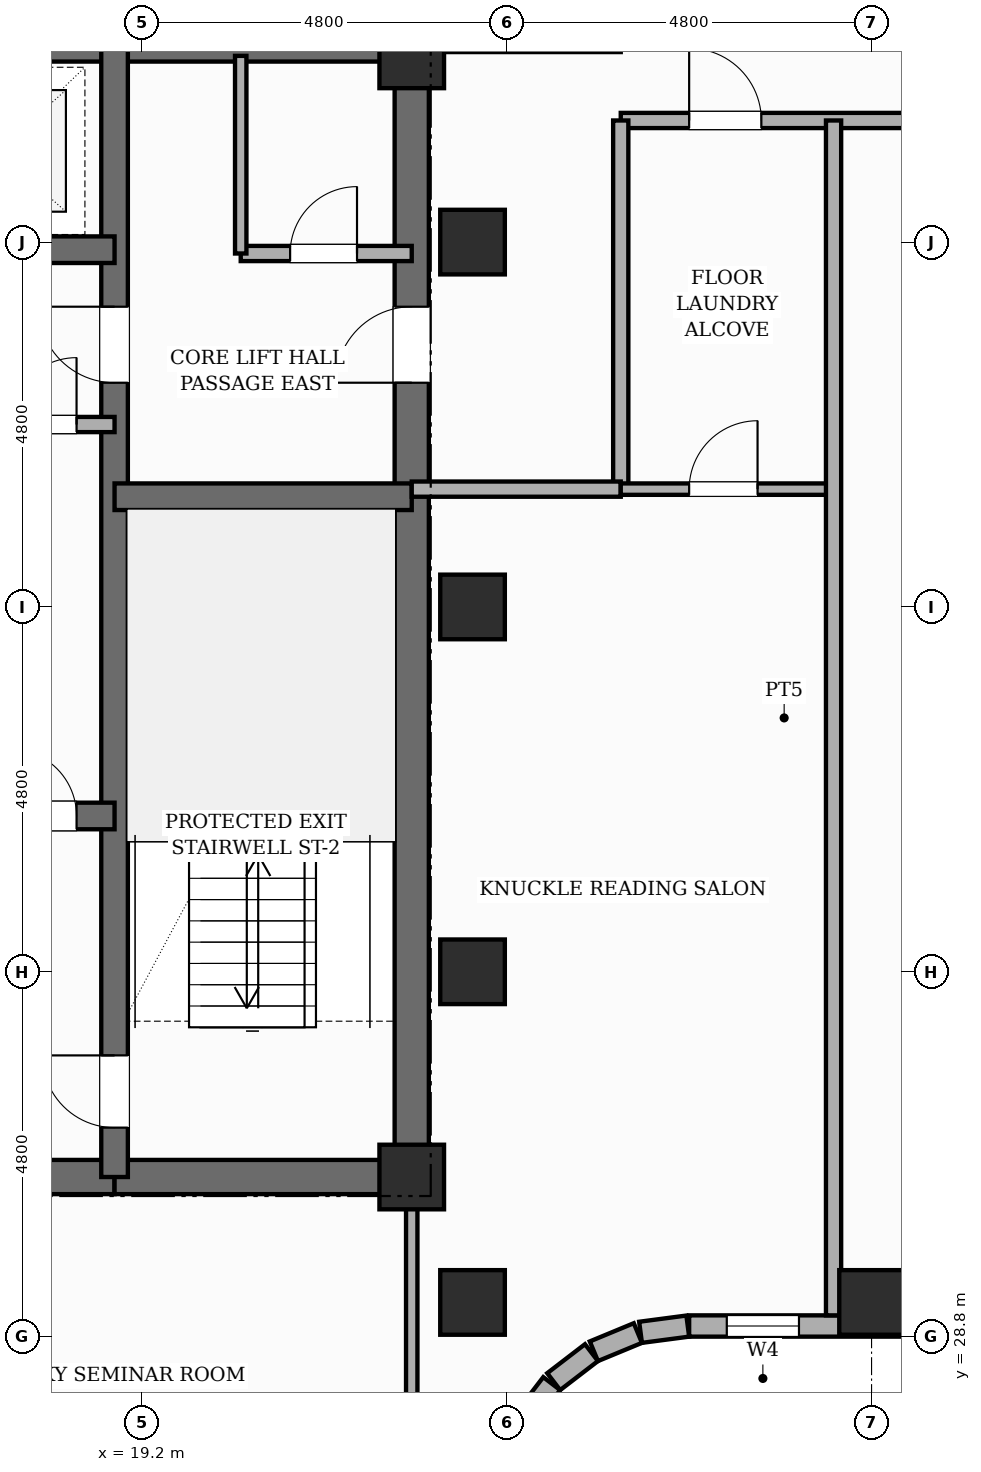
"""IFC4 building model, lengths in metres.
Left out: names, types, materials, properties, quantities, classifications, styles, units other than length and angle.
Written with IfcOpenShell. Run it as: python <this file> out.ifc"""

import sys

from ifc_helpers import new_model, si_unit, direction, frame, frame_2d, origin, origin_2d, place, context, subcontext, project, spatial, rectangle, extrude, element, fill, save


model = new_model("IFC4")
c1 = context("Model", 3, precision=1e-05, world=origin(), true_north=direction((0.0, 1.0)))
c2 = subcontext(c1, "Body", "Model", "MODEL_VIEW")
j1 = project(units=[si_unit("LENGTHUNIT", "METRE"), si_unit("PLANEANGLEUNIT", "RADIAN")], contexts=[c1])
p1 = place(None, origin())
s1 = spatial("IfcSite", under=j1, at=p1, CompositionType="ELEMENT")
p2 = place(p1, origin())
s2 = spatial("IfcBuilding", under=s1, at=p2, CompositionType="ELEMENT")
p3 = place(p2, frame((0.0, 0.0, 207.4)))
s3 = spatial("IfcBuildingStorey", under=s2, at=p3, CompositionType="ELEMENT", Elevation=207.4)
p4 = place(p3, frame((22.75, 30.675, 0.0), z_axis=(0.0, 0.0, 1.0), x_axis=(0.0, 1.0, 0.0)))
e1 = element("IfcWall", 1, at=p4, inside=s3, PredefinedType="SHEAR", context=c2, shape_type="SweptSolid", body=[
    extrude(rectangle(XDim=15.35, YDim=0.45, at=frame_2d((7.675, 0.0))), origin(), (0.0, 0.0, 1.0), 3.6),
])
p5 = place(p4, frame((10.675, 0.0, 0.0)))
e2 = element("IfcOpeningElement", 2, at=p5, cuts=e1, PredefinedType="OPENING", context=c2, shape_type="SweptSolid", body=[
    extrude(rectangle(XDim=1.0, YDim=2.15, at=frame_2d((0.5, 1.075))), frame((0.0, 0.235, 0.0), z_axis=(0.0, -1.0, 0.0), x_axis=(1.0, 0.0, 0.0)), (0.0, 0.0, 1.0), 0.47),
])
p6 = place(p3, frame((6.05, 45.8, 0.0), z_axis=(0.0, 0.0, 1.0), x_axis=(1.0, 0.0, 0.0)))
e3 = element("IfcWall", 3, at=p6, inside=s3, PredefinedType="SHEAR", context=c2, shape_type="SweptSolid", body=[
    extrude(rectangle(XDim=16.7, YDim=0.45, at=frame_2d((8.35, 0.0))), origin(), (0.0, 0.0, 1.0), 3.6),
])
p7 = place(p3, frame((9.96, 30.9, 0.0), z_axis=(0.0, 0.0, 1.0), x_axis=(1.0, 0.0, 0.0)))
e4 = element("IfcWall", 4, at=p7, inside=s3, PredefinedType="SHEAR", context=c2, shape_type="SweptSolid", body=[
    extrude(rectangle(XDim=8.88, YDim=0.45, at=frame_2d((4.44, 0.0))), origin(), (0.0, 0.0, 1.0), 3.6),
])
p8 = place(p7, frame((4.09, 0.0, 0.0)))
e5 = element("IfcOpeningElement", 5, at=p8, cuts=e4, PredefinedType="OPENING", context=c2, shape_type="SweptSolid", body=[
    extrude(rectangle(XDim=1.0, YDim=2.15, at=frame_2d((0.5, 1.075))), frame((0.0, 0.235, 0.0), z_axis=(0.0, -1.0, 0.0), x_axis=(1.0, 0.0, 0.0)), (0.0, 0.0, 1.0), 0.47),
])
p9 = place(p3, frame((18.84, 30.9, 0.0), z_axis=(0.0, 0.0, 1.0), x_axis=(1.0, 0.0, 0.0)))
e6 = element("IfcWall", 6, at=p9, inside=s3, PredefinedType="SHEAR", context=c2, shape_type="SweptSolid", body=[
    extrude(rectangle(XDim=3.91, YDim=0.45, at=frame_2d((1.955, 0.0))), origin(), (0.0, 0.0, 1.0), 3.6),
])
p10 = place(p3, frame((18.84, 30.9, 0.0), z_axis=(0.0, 0.0, 1.0), x_axis=(0.0, 1.0, 0.0)))
e7 = element("IfcWall", 7, at=p10, inside=s3, PredefinedType="SHEAR", context=c2, shape_type="SweptSolid", body=[
    extrude(rectangle(XDim=14.9, YDim=0.35, at=frame_2d((7.45, 0.0))), origin(), (0.0, 0.0, 1.0), 3.6),
])
p11 = place(p10, frame((0.65, 0.0, 0.0)))
e8 = element("IfcOpeningElement", 8, at=p11, cuts=e7, PredefinedType="OPENING", context=c2, shape_type="SweptSolid", body=[
    extrude(rectangle(XDim=0.95, YDim=2.1, at=frame_2d((0.475, 1.05))), frame((0.0, 0.185, 0.0), z_axis=(0.0, -1.0, 0.0), x_axis=(1.0, 0.0, 0.0)), (0.0, 0.0, 1.0), 0.37),
])
p12 = place(p10, frame((10.45, 0.0, 0.0)))
e9 = element("IfcOpeningElement", 9, at=p12, cuts=e7, PredefinedType="OPENING", context=c2, shape_type="SweptSolid", body=[
    extrude(rectangle(XDim=1.0, YDim=2.15, at=frame_2d((0.5, 1.075))), frame((0.0, 0.185, 0.0), z_axis=(0.0, -1.0, 0.0), x_axis=(1.0, 0.0, 0.0)), (0.0, 0.0, 1.0), 0.37),
])
p13 = place(p3, frame((18.84, 39.85, 0.0), z_axis=(0.0, 0.0, 1.0), x_axis=(1.0, 0.0, 0.0)))
e10 = element("IfcWall", 10, at=p13, inside=s3, PredefinedType="SHEAR", context=c2, shape_type="SweptSolid", body=[
    extrude(rectangle(XDim=3.91, YDim=0.35, at=frame_2d((1.955, 0.0))), origin(), (0.0, 0.0, 1.0), 3.6),
])
p14 = place(p3, frame((9.96, 35.65, 0.0), z_axis=(0.0, 0.0, 1.0), x_axis=(1.0, 0.0, 0.0)))
e11 = element("IfcWall", 11, at=p14, inside=s3, PredefinedType="SHEAR", context=c2, shape_type="SweptSolid", body=[
    extrude(rectangle(XDim=8.88, YDim=0.35, at=frame_2d((4.44, 0.0))), origin(), (0.0, 0.0, 1.0), 3.6),
])
p15 = place(p14, frame((0.84, 0.0, 0.0)))
e12 = element("IfcOpeningElement", 12, at=p15, cuts=e11, PredefinedType="OPENING", context=c2, shape_type="SweptSolid", body=[
    extrude(rectangle(XDim=1.1, YDim=2.15, at=frame_2d((0.55, 1.075))), frame((0.0, 0.185, 0.0), z_axis=(0.0, -1.0, 0.0), x_axis=(1.0, 0.0, 0.0)), (0.0, 0.0, 1.0), 0.37),
])
p16 = place(p14, frame((5.24, 0.0, 0.0)))
e13 = element("IfcOpeningElement", 13, at=p16, cuts=e11, PredefinedType="OPENING", context=c2, shape_type="SweptSolid", body=[
    extrude(rectangle(XDim=1.1, YDim=2.15, at=frame_2d((0.55, 1.075))), frame((0.0, 0.185, 0.0), z_axis=(0.0, -1.0, 0.0), x_axis=(1.0, 0.0, 0.0)), (0.0, 0.0, 1.0), 0.37),
])
p17 = place(p14, frame((7.5, 0.0, 0.0)))
e14 = element("IfcOpeningElement", 14, at=p17, cuts=e11, PredefinedType="OPENING", context=c2, shape_type="SweptSolid", body=[
    extrude(rectangle(XDim=0.88, YDim=2.1, at=frame_2d((0.44, 1.05))), frame((0.0, 0.185, 0.0), z_axis=(0.0, -1.0, 0.0), x_axis=(1.0, 0.0, 0.0)), (0.0, 0.0, 1.0), 0.37),
])
p18 = place(p3, frame((9.96, 43.1, 0.0), z_axis=(0.0, 0.0, 1.0), x_axis=(1.0, 0.0, 0.0)))
e15 = element("IfcWall", 15, at=p18, inside=s3, PredefinedType="SHEAR", context=c2, shape_type="SweptSolid", body=[
    extrude(rectangle(XDim=8.88, YDim=0.35, at=frame_2d((4.44, 0.0))), origin(), (0.0, 0.0, 1.0), 3.6),
])
p19 = place(p18, frame((0.99, 0.0, 0.0)))
e16 = element("IfcOpeningElement", 16, at=p19, cuts=e15, PredefinedType="OPENING", context=c2, shape_type="SweptSolid", body=[
    extrude(rectangle(XDim=1.1, YDim=2.15, at=frame_2d((0.55, 1.075))), frame((0.0, 0.185, 0.0), z_axis=(0.0, -1.0, 0.0), x_axis=(1.0, 0.0, 0.0)), (0.0, 0.0, 1.0), 0.37),
])
p20 = place(p18, frame((3.89, 0.0, 0.0)))
e17 = element("IfcOpeningElement", 17, at=p20, cuts=e15, PredefinedType="OPENING", context=c2, shape_type="SweptSolid", body=[
    extrude(rectangle(XDim=1.1, YDim=2.15, at=frame_2d((0.55, 1.075))), frame((0.0, 0.185, 0.0), z_axis=(0.0, -1.0, 0.0), x_axis=(1.0, 0.0, 0.0)), (0.0, 0.0, 1.0), 0.37),
])
p21 = place(p18, frame((6.79, 0.0, 0.0)))
e18 = element("IfcOpeningElement", 18, at=p21, cuts=e15, PredefinedType="OPENING", context=c2, shape_type="SweptSolid", body=[
    extrude(rectangle(XDim=1.1, YDim=2.15, at=frame_2d((0.55, 1.075))), frame((0.0, 0.185, 0.0), z_axis=(0.0, -1.0, 0.0), x_axis=(1.0, 0.0, 0.0)), (0.0, 0.0, 1.0), 0.37),
])
for number, where, z_axis, x_axis in (
    (19, (22.75, 30.9, 0.0), (0.0, 0.0, 1.0), (1.0, 0.0, 0.0)),
    (20, (22.75, 45.65, 0.0), (0.0, 0.0, 1.0), (1.0, 0.0, 0.0)),
    (21, (23.55, 29.25, 0.0), (0.0, 0.0, 1.0), (1.0, 0.0, 0.0)),
    (22, (23.55, 33.6, 0.0), (0.0, 0.0, 1.0), (1.0, 0.0, 0.0)),
    (23, (23.55, 38.4, 0.0), (0.0, 0.0, 1.0), (1.0, 0.0, 0.0)),
    (24, (23.55, 43.2, 0.0), (0.0, 0.0, 1.0), (1.0, 0.0, 0.0)),
    (25, (28.8, 29.25, 0.0), (0.0, 0.0, 1.0), (1.0, 0.0, 0.0)),
):
    element("IfcColumn", number, at=place(p3, frame(where, z_axis=z_axis, x_axis=x_axis)), inside=s3, PredefinedType="COLUMN", context=c2, shape_type="SweptSolid", body=[
        extrude(rectangle(XDim=0.85, YDim=0.85, at=origin_2d()), origin(), (0.0, 0.0, 1.0), 3.6),
    ])
p22 = place(p3, frame((50.4, 28.94, 0.0), z_axis=(0.0, 0.0, 1.0), x_axis=(-1.0, 0.0, 0.0)))
e26 = element("IfcWall", 26, at=p22, inside=s3, PredefinedType="STANDARD", context=c2, shape_type="SweptSolid", body=[
    extrude(rectangle(XDim=24.0, YDim=0.28, at=frame_2d((12.0, 0.0))), origin(), (0.0, 0.0, 1.0), 2.66),
])
p23 = place(p22, frame((17.61, 0.0, 0.45)))
e27 = element("IfcOpeningElement", 27, at=p23, cuts=e26, PredefinedType="OPENING", context=c2, shape_type="SweptSolid", body=[
    extrude(rectangle(XDim=0.95, YDim=1.8, at=frame_2d((0.475, 0.9))), frame((0.0, 0.15, 0.0), z_axis=(0.0, -1.0, 0.0), x_axis=(1.0, 0.0, 0.0)), (0.0, 0.0, 1.0), 0.3),
])
p24 = place(p22, frame((9.438, 0.0, 0.65)))
e28 = element("IfcOpeningElement", 28, at=p24, cuts=e26, PredefinedType="OPENING", context=c2, shape_type="SweptSolid", body=[
    extrude(rectangle(XDim=1.4, YDim=1.1, at=frame_2d((0.7, 0.55))), frame((0.0, 0.15, 0.0), z_axis=(0.0, -1.0, 0.0), x_axis=(1.0, 0.0, 0.0)), (0.0, 0.0, 1.0), 0.3),
])
p25 = place(p22, frame((22.555, 0.0, 0.45)))
e29 = element("IfcOpeningElement", 29, at=p25, cuts=e26, PredefinedType="OPENING", context=c2, shape_type="SweptSolid", body=[
    extrude(rectangle(XDim=0.95, YDim=1.8, at=frame_2d((0.475, 0.9))), frame((0.0, 0.15, 0.0), z_axis=(0.0, -1.0, 0.0), x_axis=(1.0, 0.0, 0.0)), (0.0, 0.0, 1.0), 0.3),
])
p26 = place(p22, frame((4.1, 0.0, 0.65)))
e30 = element("IfcOpeningElement", 30, at=p26, cuts=e26, PredefinedType="OPENING", context=c2, shape_type="SweptSolid", body=[
    extrude(rectangle(XDim=1.4, YDim=1.1, at=frame_2d((0.7, 0.55))), frame((0.0, 0.15, 0.0), z_axis=(0.0, -1.0, 0.0), x_axis=(1.0, 0.0, 0.0)), (0.0, 0.0, 1.0), 0.3),
])
p27 = place(p22, frame((19.34, 0.0, 0.65)))
e31 = element("IfcOpeningElement", 31, at=p27, cuts=e26, PredefinedType="OPENING", context=c2, shape_type="SweptSolid", body=[
    extrude(rectangle(XDim=1.4, YDim=1.1, at=frame_2d((0.7, 0.55))), frame((0.0, 0.15, 0.0), z_axis=(0.0, -1.0, 0.0), x_axis=(1.0, 0.0, 0.0)), (0.0, 0.0, 1.0), 0.3),
])
p28 = place(p22, frame((13.76, 0.0, 0.65)))
e32 = element("IfcOpeningElement", 32, at=p28, cuts=e26, PredefinedType="OPENING", context=c2, shape_type="SweptSolid", body=[
    extrude(rectangle(XDim=1.4, YDim=1.1, at=frame_2d((0.7, 0.55))), frame((0.0, 0.15, 0.0), z_axis=(0.0, -1.0, 0.0), x_axis=(1.0, 0.0, 0.0)), (0.0, 0.0, 1.0), 0.3),
])
p29 = place(p22, frame((0.681, 0.0, 0.45)))
e33 = element("IfcOpeningElement", 33, at=p29, cuts=e26, PredefinedType="OPENING", context=c2, shape_type="SweptSolid", body=[
    extrude(rectangle(XDim=0.95, YDim=1.8, at=frame_2d((0.475, 0.9))), frame((0.0, 0.15, 0.0), z_axis=(0.0, -1.0, 0.0), x_axis=(1.0, 0.0, 0.0)), (0.0, 0.0, 1.0), 0.3),
])
p30 = place(p3, frame((26.382, 28.939, 0.0), z_axis=(0.0, 0.0, 1.0), x_axis=(-0.9914410257, -0.130555323746, 0.0)))
e34 = element("IfcWall", 34, at=p30, inside=s3, PredefinedType="STANDARD", context=c2, shape_type="SweptSolid", body=[
    extrude(rectangle(XDim=0.626, YDim=0.28, at=frame_2d((0.313, 0.0))), origin(), (0.0, 0.0, 1.0), 3.38),
])
p31 = place(p3, frame((25.725, 28.847, 0.0), z_axis=(0.0, 0.0, 1.0), x_axis=(-0.923974080304, -0.382455093999, 0.0)))
e35 = element("IfcWall", 35, at=p31, inside=s3, PredefinedType="STANDARD", context=c2, shape_type="SweptSolid", body=[
    extrude(rectangle(XDim=0.626, YDim=0.28, at=frame_2d((0.313, 0.0))), origin(), (0.0, 0.0, 1.0), 3.38),
])
for number, where, z_axis, x_axis in (
    (36, (25.115, 28.59, 0.0), (0.0, 0.0, 1.0), (-0.793, -0.609, 0.0)),
    (37, (24.592, 28.182, 0.0), (0.0, 0.0, 1.0), (-0.609, -0.793, 0.0)),
):
    element("IfcWall", number, at=place(p3, frame(where, z_axis=z_axis, x_axis=x_axis)), inside=s3, PredefinedType="STANDARD", context=c2, shape_type="SweptSolid", body=[
        extrude(rectangle(XDim=0.626, YDim=0.28, at=frame_2d((0.313, 0.0))), origin(), (0.0, 0.0, 1.0), 3.38),
    ])
p32 = place(p3, frame((9.96, 40.8, 0.0), z_axis=(0.0, 0.0, 1.0), x_axis=(1.0, 0.0, 0.0)))
e38 = element("IfcWall", 38, at=p32, inside=s3, PredefinedType="POLYGONAL", context=c2, shape_type="SweptSolid", body=[
    extrude(rectangle(XDim=8.88, YDim=0.2, at=frame_2d((4.44, 0.0))), origin(), (0.0, 0.0, 1.0), 3.38),
])
p33 = place(p32, frame((7.5, 0.0, 0.0)))
e39 = element("IfcOpeningElement", 39, at=p33, cuts=e38, PredefinedType="OPENING", context=c2, shape_type="SweptSolid", body=[
    extrude(rectangle(XDim=0.88, YDim=2.1, at=frame_2d((0.44, 1.05))), frame((0.0, 0.11, 0.0), z_axis=(0.0, -1.0, 0.0), x_axis=(1.0, 0.0, 0.0)), (0.0, 0.0, 1.0), 0.22),
])
p34 = place(p32, frame((1.0, 0.0, 0.0)))
e40 = element("IfcOpeningElement", 40, at=p34, cuts=e38, PredefinedType="OPENING", context=c2, shape_type="SweptSolid", body=[
    extrude(rectangle(XDim=0.88, YDim=2.1, at=frame_2d((0.44, 1.05))), frame((0.0, 0.11, 0.0), z_axis=(0.0, -1.0, 0.0), x_axis=(1.0, 0.0, 0.0)), (0.0, 0.0, 1.0), 0.22),
])
p35 = place(p32, frame((3.4, 0.0, 0.0)))
e41 = element("IfcOpeningElement", 41, at=p35, cuts=e38, PredefinedType="OPENING", context=c2, shape_type="SweptSolid", body=[
    extrude(rectangle(XDim=0.88, YDim=2.1, at=frame_2d((0.44, 1.05))), frame((0.0, 0.11, 0.0), z_axis=(0.0, -1.0, 0.0), x_axis=(1.0, 0.0, 0.0)), (0.0, 0.0, 1.0), 0.22),
])
p36 = place(p32, frame((5.55, 0.0, 0.0)))
e42 = element("IfcOpeningElement", 42, at=p36, cuts=e38, PredefinedType="OPENING", context=c2, shape_type="SweptSolid", body=[
    extrude(rectangle(XDim=0.88, YDim=2.1, at=frame_2d((0.44, 1.05))), frame((0.0, 0.11, 0.0), z_axis=(0.0, -1.0, 0.0), x_axis=(1.0, 0.0, 0.0)), (0.0, 0.0, 1.0), 0.22),
])
p37 = place(p3, frame((20.5, 43.05, 0.0), z_axis=(0.0, 0.0, 1.0), x_axis=(1.0, 0.0, 0.0)))
e43 = element("IfcWall", 43, at=p37, inside=s3, PredefinedType="POLYGONAL", context=c2, shape_type="SweptSolid", body=[
    extrude(rectangle(XDim=2.25, YDim=0.2, at=frame_2d((1.125, 0.0))), origin(), (0.0, 0.0, 1.0), 2.66),
])
p38 = place(p37, frame((0.65, 0.0, 0.0)))
e44 = element("IfcOpeningElement", 44, at=p38, cuts=e43, PredefinedType="OPENING", context=c2, shape_type="SweptSolid", body=[
    extrude(rectangle(XDim=0.88, YDim=2.1, at=frame_2d((0.44, 1.05))), frame((0.0, 0.11, 0.0), z_axis=(0.0, -1.0, 0.0), x_axis=(1.0, 0.0, 0.0)), (0.0, 0.0, 1.0), 0.22),
])
p39 = place(p3, frame((20.5, 43.05, 0.0), z_axis=(0.0, 0.0, 1.0), x_axis=(0.0, 1.0, 0.0)))
e45 = element("IfcWall", 45, at=p39, inside=s3, PredefinedType="PARTITIONING", context=c2, shape_type="SweptSolid", body=[
    extrude(rectangle(XDim=2.6, YDim=0.15, at=frame_2d((1.3, 0.0))), origin(), (0.0, 0.0, 1.0), 3.38),
])
p40 = place(p3, frame((22.75, 25.75, 0.0), z_axis=(0.0, 0.0, 1.0), x_axis=(0.0, 1.0, 0.0)))
e46 = element("IfcWall", 46, at=p40, inside=s3, PredefinedType="PARTITIONING", context=c2, shape_type="SweptSolid", body=[
    extrude(rectangle(XDim=5.15, YDim=0.15, at=frame_2d((2.575, 0.0))), origin(), (0.0, 0.0, 1.0), 3.38),
])
p41 = place(p3, frame((25.5, 44.8, 0.0), z_axis=(0.0, 0.0, 1.0), x_axis=(1.0, 0.0, 0.0)))
e47 = element("IfcWall", 47, at=p41, inside=s3, PredefinedType="PARTITIONING", context=c2, shape_type="SweptSolid", body=[
    extrude(rectangle(XDim=16.28, YDim=0.2, at=frame_2d((8.14, 0.0))), origin(), (0.0, 0.0, 1.0), 3.38),
])
p42 = place(p41, frame((0.9, 0.0, 0.0)))
e48 = element("IfcOpeningElement", 48, at=p42, cuts=e47, PredefinedType="OPENING", context=c2, shape_type="SweptSolid", body=[
    extrude(rectangle(XDim=0.95, YDim=2.15, at=frame_2d((0.475, 1.075))), frame((0.0, 0.11, 0.0), z_axis=(0.0, -1.0, 0.0), x_axis=(1.0, 0.0, 0.0)), (0.0, 0.0, 1.0), 0.22),
])
p43 = place(p41, frame((3.988, 0.0, 0.0)))
e49 = element("IfcOpeningElement", 49, at=p43, cuts=e47, PredefinedType="OPENING", context=c2, shape_type="SweptSolid", body=[
    extrude(rectangle(XDim=0.98, YDim=2.18, at=frame_2d((0.49, 1.09))), frame((0.0, 0.11, 0.0), z_axis=(0.0, -1.0, 0.0), x_axis=(1.0, 0.0, 0.0)), (0.0, 0.0, 1.0), 0.22),
])
p44 = place(p41, frame((9.99, 0.0, 0.0)))
e50 = element("IfcOpeningElement", 50, at=p44, cuts=e47, PredefinedType="OPENING", context=c2, shape_type="SweptSolid", body=[
    extrude(rectangle(XDim=0.98, YDim=2.18, at=frame_2d((0.49, 1.09))), frame((0.0, 0.11, 0.0), z_axis=(0.0, -1.0, 0.0), x_axis=(1.0, 0.0, 0.0)), (0.0, 0.0, 1.0), 0.22),
])
p45 = place(p3, frame((25.5, 39.95, 0.0), z_axis=(0.0, 0.0, 1.0), x_axis=(0.0, 1.0, 0.0)))
e51 = element("IfcWall", 51, at=p45, inside=s3, PredefinedType="PARTITIONING", context=c2, shape_type="SweptSolid", body=[
    extrude(rectangle(XDim=4.85, YDim=0.2, at=frame_2d((2.425, 0.0))), origin(), (0.0, 0.0, 1.0), 3.38),
])
p46 = place(p3, frame((22.75, 39.95, 0.0), z_axis=(0.0, 0.0, 1.0), x_axis=(1.0, 0.0, 0.0)))
e52 = element("IfcWall", 52, at=p46, inside=s3, PredefinedType="PARTITIONING", context=c2, shape_type="SweptSolid", body=[
    extrude(rectangle(XDim=2.75, YDim=0.2, at=frame_2d((1.375, 0.0))), origin(), (0.0, 0.0, 1.0), 3.38),
])
p47 = place(p3, frame((25.5, 39.95, 0.0), z_axis=(0.0, 0.0, 1.0), x_axis=(1.0, 0.0, 0.0)))
e53 = element("IfcWall", 53, at=p47, inside=s3, PredefinedType="PARTITIONING", context=c2, shape_type="SweptSolid", body=[
    extrude(rectangle(XDim=2.8, YDim=0.15, at=frame_2d((1.4, 0.0))), origin(), (0.0, 0.0, 1.0), 3.38),
])
p48 = place(p47, frame((0.9, 0.0, 0.0)))
e54 = element("IfcOpeningElement", 54, at=p48, cuts=e53, PredefinedType="OPENING", context=c2, shape_type="SweptSolid", body=[
    extrude(rectangle(XDim=0.9, YDim=2.15, at=frame_2d((0.45, 1.075))), frame((0.0, 0.085, 0.0), z_axis=(0.0, -1.0, 0.0), x_axis=(1.0, 0.0, 0.0)), (0.0, 0.0, 1.0), 0.17),
])
p49 = place(p3, frame((28.3, 29.08, 0.0), z_axis=(0.0, 0.0, 1.0), x_axis=(0.0, 1.0, 0.0)))
e55 = element("IfcWall", 55, at=p49, inside=s3, PredefinedType="SOLIDWALL", context=c2, shape_type="SweptSolid", body=[
    extrude(rectangle(XDim=15.72, YDim=0.2, at=frame_2d((7.86, 0.0))), origin(), (0.0, 0.0, 1.0), 3.38),
])
p50 = place(p25, origin())
e56 = element("IfcWindow", 56, at=p50, inside=s3, PartitioningType="SINGLE_PANEL", PredefinedType="WINDOW", context=c2, shape_type="SweptSolid", body=[
    extrude(rectangle(XDim=0.95, YDim=1.8, at=frame_2d((0.475, 0.9))), frame((0.0, 0.03, 0.0), z_axis=(0.0, -1.0, 0.0), x_axis=(1.0, 0.0, 0.0)), (0.0, 0.0, 1.0), 0.06),
])
fill(e29, e56)
p51 = place(p11, origin())
e57 = element("IfcDoor", 57, at=p51, inside=s3, OperationType="SINGLE_SWING_RIGHT", PredefinedType="DOOR", context=c2, shape_type="SweptSolid", body=[
    extrude(rectangle(XDim=0.95, YDim=2.1, at=frame_2d((0.475, 1.05))), frame((0.0, 0.025, 0.0), z_axis=(0.0, -1.0, 0.0), x_axis=(1.0, 0.0, 0.0)), (0.0, 0.0, 1.0), 0.05),
])
fill(e8, e57)
p52 = place(p17, origin())
e58 = element("IfcDoor", 58, at=p52, inside=s3, OperationType="SINGLE_SWING_LEFT", PredefinedType="DOOR", context=c2, shape_type="SweptSolid", body=[
    extrude(rectangle(XDim=0.88, YDim=2.1, at=frame_2d((0.44, 1.05))), frame((0.0, 0.025, 0.0), z_axis=(0.0, -1.0, 0.0), x_axis=(1.0, 0.0, 0.0)), (0.0, 0.0, 1.0), 0.05),
])
fill(e14, e58)
p53 = place(p33, origin())
e59 = element("IfcDoor", 59, at=p53, inside=s3, OperationType="SINGLE_SWING_RIGHT", PredefinedType="DOOR", context=c2, shape_type="SweptSolid", body=[
    extrude(rectangle(XDim=0.88, YDim=2.1, at=frame_2d((0.44, 1.05))), frame((0.0, 0.025, 0.0), z_axis=(0.0, -1.0, 0.0), x_axis=(1.0, 0.0, 0.0)), (0.0, 0.0, 1.0), 0.05),
])
fill(e39, e59)
p54 = place(p12, origin())
e60 = element("IfcDoor", 60, at=p54, inside=s3, OperationType="SINGLE_SWING_RIGHT", PredefinedType="DOOR", context=c2, shape_type="SweptSolid", body=[
    extrude(rectangle(XDim=1.0, YDim=2.15, at=frame_2d((0.5, 1.075))), frame((0.0, 0.025, 0.0), z_axis=(0.0, -1.0, 0.0), x_axis=(1.0, 0.0, 0.0)), (0.0, 0.0, 1.0), 0.05),
])
fill(e9, e60)
p55 = place(p5, origin())
e61 = element("IfcDoor", 61, at=p55, inside=s3, OperationType="SINGLE_SWING_LEFT", PredefinedType="DOOR", context=c2, shape_type="SweptSolid", body=[
    extrude(rectangle(XDim=1.0, YDim=2.15, at=frame_2d((0.5, 1.075))), frame((0.0, 0.025, 0.0), z_axis=(0.0, -1.0, 0.0), x_axis=(1.0, 0.0, 0.0)), (0.0, 0.0, 1.0), 0.05),
])
fill(e2, e61)
p56 = place(p38, origin())
e62 = element("IfcDoor", 62, at=p56, inside=s3, OperationType="SINGLE_SWING_RIGHT", PredefinedType="DOOR", context=c2, shape_type="SweptSolid", body=[
    extrude(rectangle(XDim=0.88, YDim=2.1, at=frame_2d((0.44, 1.05))), frame((0.0, 0.025, 0.0), z_axis=(0.0, -1.0, 0.0), x_axis=(1.0, 0.0, 0.0)), (0.0, 0.0, 1.0), 0.05),
])
fill(e44, e62)
p57 = place(p42, origin())
e63 = element("IfcDoor", 63, at=p57, inside=s3, OperationType="SINGLE_SWING_LEFT", PredefinedType="DOOR", context=c2, shape_type="SweptSolid", body=[
    extrude(rectangle(XDim=0.95, YDim=2.15, at=frame_2d((0.475, 1.075))), frame((0.0, 0.025, 0.0), z_axis=(0.0, -1.0, 0.0), x_axis=(1.0, 0.0, 0.0)), (0.0, 0.0, 1.0), 0.05),
])
fill(e48, e63)
p58 = place(p48, origin())
e64 = element("IfcDoor", 64, at=p58, inside=s3, OperationType="SINGLE_SWING_RIGHT", PredefinedType="DOOR", context=c2, shape_type="SweptSolid", body=[
    extrude(rectangle(XDim=0.9, YDim=2.15, at=frame_2d((0.45, 1.075))), frame((0.0, 0.025, 0.0), z_axis=(0.0, -1.0, 0.0), x_axis=(1.0, 0.0, 0.0)), (0.0, 0.0, 1.0), 0.05),
])
fill(e54, e64)
save(model, sys.argv[1])
